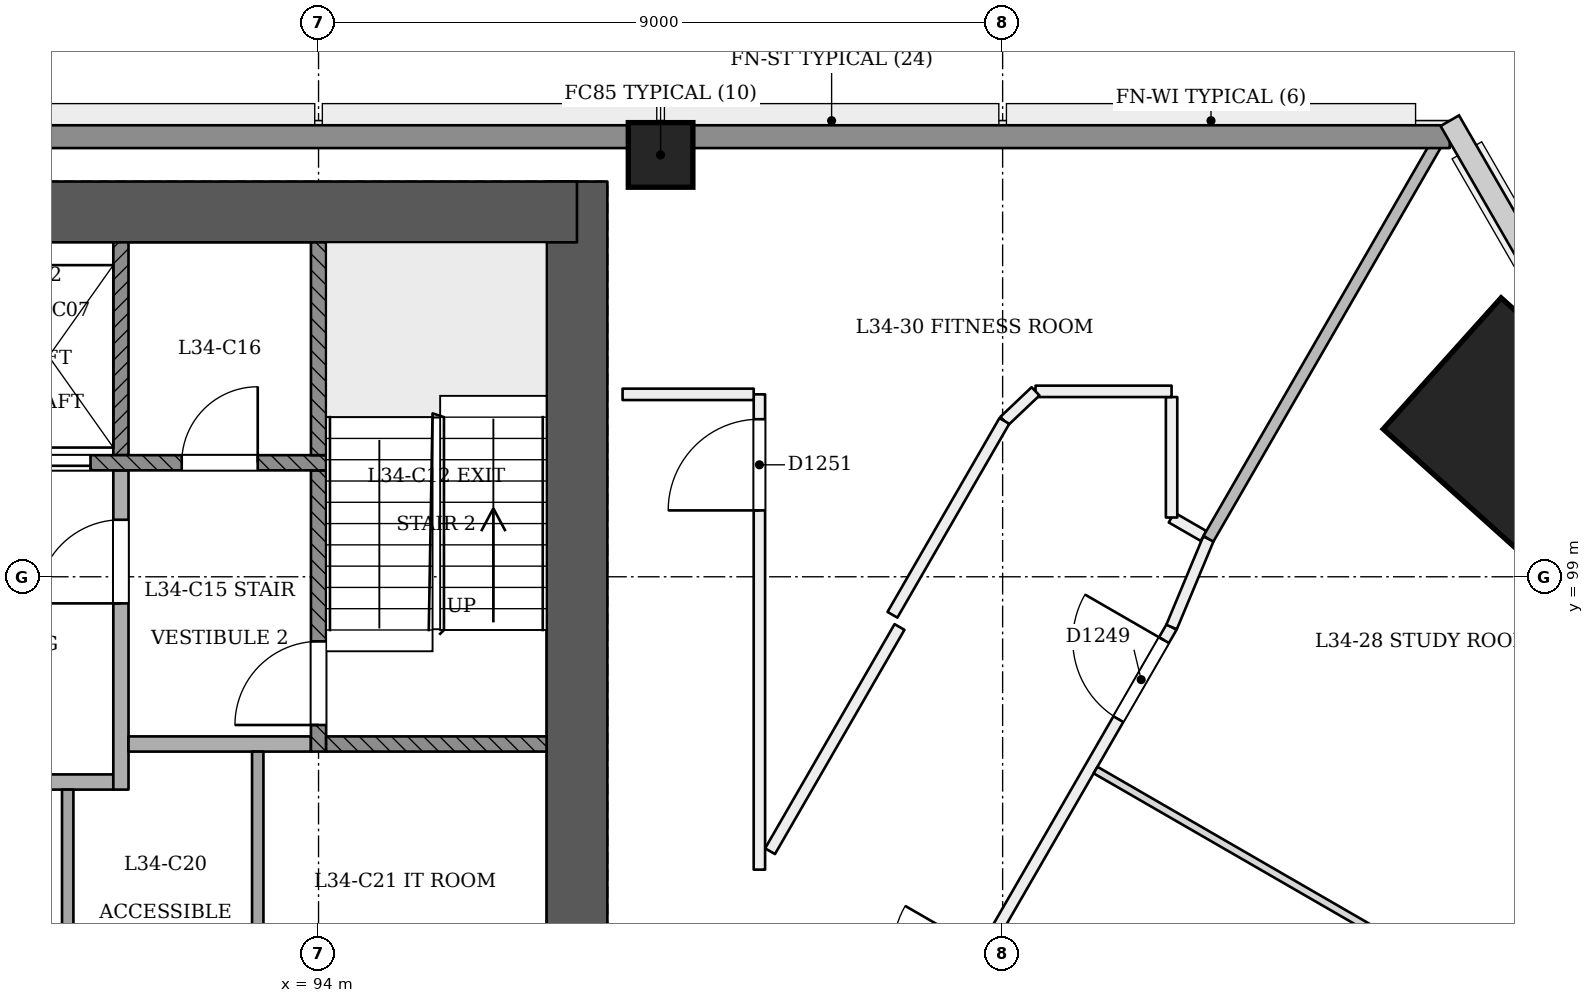
"""IFC4 building model, lengths in metres.
Left out: names, types, materials, properties, quantities, classifications, styles, units other than length and angle.
Written with IfcOpenShell. Run it as: python <this file> out.ifc"""

import sys

from ifc_helpers import new_model, si_unit, direction, frame, frame_2d, origin, origin_2d, place, context, subcontext, project, spatial, rectangle, extrude, element, fill, save


model = new_model("IFC4")
c1 = context("Model", 3, precision=1e-05, world=origin(), true_north=direction((0.0, 1.0)))
c2 = subcontext(c1, "Body", "Model", "MODEL_VIEW")
j1 = project(units=[si_unit("LENGTHUNIT", "METRE"), si_unit("PLANEANGLEUNIT", "RADIAN")], contexts=[c1])
p1 = place(None, origin())
s1 = spatial("IfcSite", under=j1, at=p1, CompositionType="ELEMENT")
p2 = place(p1, origin())
s2 = spatial("IfcBuilding", under=s1, at=p2, CompositionType="ELEMENT")
p3 = place(p2, frame((0.0, 0.0, 135.0)))
s3 = spatial("IfcBuildingStorey", under=s2, at=p3, CompositionType="ELEMENT", Elevation=135.0)
p4 = place(p3, frame((97.4, 93.0, 0.0), z_axis=(0.0, 0.0, 1.0), x_axis=(0.0, 1.0, 0.0)))
e1 = element("IfcWall", 1, at=p4, inside=s3, PredefinedType="SHEAR", context=c2, shape_type="SweptSolid", body=[
    extrude(rectangle(XDim=11.2, YDim=0.8, at=frame_2d((5.6, 0.0))), origin(), (0.0, 0.0, 1.0), 3.6),
])
p5 = place(p3, frame((97.4, 103.8, 0.0), z_axis=(0.0, 0.0, 1.0), x_axis=(-1.0, 0.0, 0.0)))
e2 = element("IfcWall", 2, at=p5, inside=s3, PredefinedType="SHEAR", context=c2, shape_type="SweptSolid", body=[
    extrude(rectangle(XDim=25.2, YDim=0.8, at=frame_2d((12.6, 0.0))), origin(), (0.0, 0.0, 1.0), 3.6),
])
p6 = place(p3, frame((109.68, 101.02, 0.0), z_axis=(-0.028401814599, 0.009218727412, 0.999554076572), x_axis=(0.500749800061, -0.865307108475, 0.022209136917)))
e3 = element("IfcColumn", 3, at=p6, inside=s3, PredefinedType="COLUMN", context=c2, shape_type="SweptSolid", body=[
    extrude(rectangle(XDim=2.32, YDim=2.32, at=origin_2d()), origin(), (0.0, 0.0, 1.0), 3.602),
])
p7 = place(p3, frame((98.5, 104.55, 0.0), z_axis=(0.0, 0.0, 1.0), x_axis=(1.0, 0.0, 0.0)))
e4 = element("IfcColumn", 4, at=p7, inside=s3, PredefinedType="COLUMN", context=c2, shape_type="SweptSolid", body=[
    extrude(rectangle(XDim=0.85, YDim=0.85, at=origin_2d()), origin(), (0.0, 0.0, 1.0), 3.6),
])
p8 = place(p3, frame((85.093, 63.473, 0.0), z_axis=(0.0, 0.0, 1.0), x_axis=(0.499997513821, 0.866026839176, 0.0)))
e5 = element("IfcWall", 5, at=p8, inside=s3, PredefinedType="PARTITIONING", context=c2, shape_type="SweptSolid", body=[
    extrude(rectangle(XDim=40.26, YDim=0.15, at=frame_2d((20.13, 0.0))), origin(), (0.0, 0.0, 1.0), 2.75),
])
p9 = place(p8, frame((0.429, 0.0, 0.0)))
e6 = element("IfcOpeningElement", 6, at=p9, cuts=e5, PredefinedType="OPENING", context=c2, shape_type="SweptSolid", body=[
    extrude(rectangle(XDim=1.2, YDim=2.1, at=frame_2d((0.6, 1.05))), frame((0.0, 0.085, 0.0), z_axis=(0.0, -1.0, 0.0), x_axis=(1.0, 0.0, 0.0)), (0.0, 0.0, 1.0), 0.171),
])
p10 = place(p8, frame((2.85, 0.0, 0.0)))
e7 = element("IfcOpeningElement", 7, at=p10, cuts=e5, PredefinedType="OPENING", context=c2, shape_type="SweptSolid", body=[
    extrude(rectangle(XDim=1.0, YDim=2.1, at=frame_2d((0.5, 1.05))), frame((0.0, 0.085, 0.0), z_axis=(0.0, -1.0, 0.0), x_axis=(1.0, 0.0, 0.0)), (0.0, 0.0, 1.0), 0.171),
])
p11 = place(p8, frame((8.28, 0.0, 0.0)))
e8 = element("IfcOpeningElement", 8, at=p11, cuts=e5, PredefinedType="OPENING", context=c2, shape_type="SweptSolid", body=[
    extrude(rectangle(XDim=1.2, YDim=2.1, at=frame_2d((0.6, 1.05))), frame((0.0, 0.085, 0.0), z_axis=(0.0, -1.0, 0.0), x_axis=(1.0, 0.0, 0.0)), (0.0, 0.0, 1.0), 0.171),
])
p12 = place(p8, frame((11.735, 0.0, 0.0)))
e9 = element("IfcOpeningElement", 9, at=p12, cuts=e5, PredefinedType="OPENING", context=c2, shape_type="SweptSolid", body=[
    extrude(rectangle(XDim=1.0, YDim=2.1, at=frame_2d((0.5, 1.05))), frame((0.0, 0.085, 0.0), z_axis=(0.0, -1.0, 0.0), x_axis=(1.0, 0.0, 0.0)), (0.0, 0.0, 1.0), 0.171),
])
p13 = place(p8, frame((18.41, 0.0, 0.0)))
e10 = element("IfcOpeningElement", 10, at=p13, cuts=e5, PredefinedType="OPENING", context=c2, shape_type="SweptSolid", body=[
    extrude(rectangle(XDim=1.0, YDim=2.1, at=frame_2d((0.5, 1.05))), frame((0.0, 0.085, 0.0), z_axis=(0.0, -1.0, 0.0), x_axis=(1.0, 0.0, 0.0)), (0.0, 0.0, 1.0), 0.171),
])
p14 = place(p8, frame((20.85, 0.0, 0.0)))
e11 = element("IfcOpeningElement", 11, at=p14, cuts=e5, PredefinedType="OPENING", context=c2, shape_type="SweptSolid", body=[
    extrude(rectangle(XDim=1.0, YDim=2.1, at=frame_2d((0.5, 1.05))), frame((0.0, 0.085, 0.0), z_axis=(0.0, -1.0, 0.0), x_axis=(1.0, 0.0, 0.0)), (0.0, 0.0, 1.0), 0.171),
])
p15 = place(p8, frame((26.38, 0.0, 0.0)))
e12 = element("IfcOpeningElement", 12, at=p15, cuts=e5, PredefinedType="OPENING", context=c2, shape_type="SweptSolid", body=[
    extrude(rectangle(XDim=1.0, YDim=2.1, at=frame_2d((0.5, 1.05))), frame((0.0, 0.085, 0.0), z_axis=(0.0, -1.0, 0.0), x_axis=(1.0, 0.0, 0.0)), (0.0, 0.0, 1.0), 0.171),
])
p16 = place(p8, frame((34.13, 0.0, 0.0)))
e13 = element("IfcOpeningElement", 13, at=p16, cuts=e5, PredefinedType="OPENING", context=c2, shape_type="SweptSolid", body=[
    extrude(rectangle(XDim=1.2, YDim=2.1, at=frame_2d((0.6, 1.05))), frame((0.0, 0.085, 0.0), z_axis=(0.0, -1.0, 0.0), x_axis=(1.0, 0.0, 0.0)), (0.0, 0.0, 1.0), 0.171),
])
p17 = place(p8, frame((38.86, 0.0, 0.0)))
e14 = element("IfcOpeningElement", 14, at=p17, cuts=e5, PredefinedType="OPENING", context=c2, shape_type="SweptSolid", body=[
    extrude(rectangle(XDim=1.2, YDim=2.1, at=frame_2d((0.6, 1.05))), frame((0.0, 0.085, 0.0), z_axis=(0.0, -1.0, 0.0), x_axis=(1.0, 0.0, 0.0)), (0.0, 0.0, 1.0), 0.171),
])
p18 = place(p3, frame((105.223, 98.34, 0.0), z_axis=(0.0, 0.0, 1.0), x_axis=(0.385373445666, 0.922760698868, 0.0)))
e15 = element("IfcWall", 15, at=p18, inside=s3, PredefinedType="PARTITIONING", context=c2, shape_type="SweptSolid", body=[
    extrude(rectangle(XDim=1.258, YDim=0.15, at=frame_2d((0.629, 0.0))), origin(), (0.0, 0.0, 1.0), 3.15),
])
p19 = place(p3, frame((105.643, 99.537, 0.0), z_axis=(0.0, 0.0, 1.0), x_axis=(-0.865942558441, 0.500143464899, 0.0)))
e16 = element("IfcWall", 16, at=p19, inside=s3, PredefinedType="PARTITIONING", context=c2, shape_type="SweptSolid", body=[
    extrude(rectangle(XDim=0.485, YDim=0.15, at=frame_2d((0.243, 0.0))), origin(), (0.0, 0.0, 1.0), 3.15),
])
p20 = place(p3, frame((105.223, 99.78, 0.0), z_axis=(0.0, 0.0, 1.0), x_axis=(0.0, 1.0, 0.0)))
e17 = element("IfcWall", 17, at=p20, inside=s3, PredefinedType="PARTITIONING", context=c2, shape_type="SweptSolid", body=[
    extrude(rectangle(XDim=1.585, YDim=0.15, at=frame_2d((0.792, 0.0))), origin(), (0.0, 0.0, 1.0), 3.15),
])
p21 = place(p3, frame((105.223, 101.439, 0.0), z_axis=(0.0, 0.0, 1.0), x_axis=(-1.0, 0.0, 0.0)))
e18 = element("IfcWall", 18, at=p21, inside=s3, PredefinedType="PARTITIONING", context=c2, shape_type="SweptSolid", body=[
    extrude(rectangle(XDim=1.79, YDim=0.15, at=frame_2d((0.895, 0.0))), origin(), (0.0, 0.0, 1.0), 3.15),
])
p22 = place(p3, frame((103.433, 101.439, 0.0), z_axis=(0.0, 0.0, 1.0), x_axis=(-0.725214952248, -0.688522529069, 0.0)))
e19 = element("IfcWall", 19, at=p22, inside=s3, PredefinedType="PARTITIONING", context=c2, shape_type="SweptSolid", body=[
    extrude(rectangle(XDim=0.566, YDim=0.15, at=frame_2d((0.283, 0.0))), origin(), (0.0, 0.0, 1.0), 3.15),
])
p23 = place(p3, frame((103.023, 101.05, 0.0), z_axis=(0.0, 0.0, 1.0), x_axis=(-0.499973660256, -0.866040610509, 0.0)))
e20 = element("IfcWall", 20, at=p23, inside=s3, PredefinedType="PARTITIONING", context=c2, shape_type="SweptSolid", body=[
    extrude(rectangle(XDim=2.945, YDim=0.15, at=frame_2d((1.472, 0.0))), origin(), (0.0, 0.0, 1.0), 3.15),
])
p24 = place(p3, frame((101.643, 98.34, 0.0), z_axis=(0.0, 0.0, 1.0), x_axis=(-0.499962338254, -0.866047146712, 0.0)))
e21 = element("IfcWall", 21, at=p24, inside=s3, PredefinedType="PARTITIONING", context=c2, shape_type="SweptSolid", body=[
    extrude(rectangle(XDim=3.406, YDim=0.15, at=frame_2d((1.703, 0.0))), origin(), (0.0, 0.0, 1.0), 3.15),
])
p25 = place(p3, frame((99.8, 95.147, 0.0), z_axis=(0.0, 0.0, 1.0), x_axis=(0.0, 1.0, 0.0)))
e22 = element("IfcWall", 22, at=p25, inside=s3, PredefinedType="PARTITIONING", context=c2, shape_type="SweptSolid", body=[
    extrude(rectangle(XDim=6.253, YDim=0.15, at=frame_2d((3.126, 0.0))), origin(), (0.0, 0.0, 1.0), 3.15),
])
p26 = place(p25, frame((4.726, 0.0, 0.0)))
e23 = element("IfcOpeningElement", 23, at=p26, cuts=e22, PredefinedType="OPENING", context=c2, shape_type="SweptSolid", body=[
    extrude(rectangle(XDim=1.2, YDim=2.1, at=frame_2d((0.6, 1.05))), frame((0.0, 0.085, 0.0), z_axis=(0.0, -1.0, 0.0), x_axis=(1.0, 0.0, 0.0)), (0.0, 0.0, 1.0), 0.171),
])
p27 = place(p3, frame((99.725, 101.4, 0.0), z_axis=(0.0, 0.0, 1.0), x_axis=(-1.0, 0.0, 0.0)))
e24 = element("IfcWall", 24, at=p27, inside=s3, PredefinedType="PARTITIONING", context=c2, shape_type="SweptSolid", body=[
    extrude(rectangle(XDim=1.725, YDim=0.15, at=frame_2d((0.863, 0.0))), origin(), (0.0, 0.0, 1.0), 3.15),
])
p28 = place(p3, frame((109.718, 93.285, 0.0), z_axis=(0.0, 0.0, 1.0), x_axis=(-0.866025401434, 0.500000004071, 0.0)))
e25 = element("IfcWall", 25, at=p28, inside=s3, PredefinedType="PARTITIONING", context=c2, shape_type="SweptSolid", body=[
    extrude(rectangle(XDim=6.345, YDim=0.1, at=frame_2d((3.173, 0.0))), origin(), (0.0, 0.0, 1.0), 2.65),
])
p29 = place(p3, frame((108.825, 104.9, 0.0), z_axis=(0.0, 0.0, 1.0), x_axis=(-0.500004896655, -0.866022576681, 0.0)))
e26 = element("IfcWall", 26, at=p29, inside=s3, PredefinedType="PARTITIONING", context=c2, shape_type="SweptSolid", body=[
    extrude(rectangle(XDim=6.235, YDim=0.15, at=frame_2d((3.118, 0.0))), origin(), (0.0, 0.0, 1.0), 2.65),
])
p30 = place(p3, frame((61.117, 104.79, 0.0), z_axis=(0.0, 0.0, 1.0), x_axis=(1.0, 0.0, 0.0)))
e27 = element("IfcWall", 27, at=p30, inside=s3, PredefinedType="SOLIDWALL", context=c2, shape_type="SweptSolid", body=[
    extrude(rectangle(XDim=47.766, YDim=0.3, at=frame_2d((23.883, 0.0))), origin(), (0.0, 0.0, 1.0), 2.65),
])
p31 = place(p3, frame((90.7, 93.4, 0.0), z_axis=(0.0, 0.0, 1.0), x_axis=(0.0, 1.0, 0.0)))
e28 = element("IfcWall", 28, at=p31, inside=s3, PredefinedType="PARTITIONING", context=c2, shape_type="SweptSolid", body=[
    extrude(rectangle(XDim=2.8, YDim=0.15, at=frame_2d((1.4, 0.0))), origin(), (0.0, 0.0, 1.0), 3.15),
])
p32 = place(p3, frame((93.2, 93.4, 0.0), z_axis=(0.0, 0.0, 1.0), x_axis=(0.0, 1.0, 0.0)))
e29 = element("IfcWall", 29, at=p32, inside=s3, PredefinedType="PARTITIONING", context=c2, shape_type="SweptSolid", body=[
    extrude(rectangle(XDim=3.3, YDim=0.15, at=frame_2d((1.65, 0.0))), origin(), (0.0, 0.0, 1.0), 3.15),
])
p33 = place(p3, frame((87.7, 96.3, 0.0), z_axis=(0.0, 0.0, 1.0), x_axis=(1.0, 0.0, 0.0)))
e30 = element("IfcWall", 30, at=p33, inside=s3, PredefinedType="PARTITIONING", context=c2, shape_type="SweptSolid", body=[
    extrude(rectangle(XDim=3.6, YDim=0.2, at=frame_2d((1.8, 0.0))), origin(), (0.0, 0.0, 1.0), 3.15),
])
p34 = place(p3, frame((91.4, 96.2, 0.0), z_axis=(0.0, 0.0, 1.0), x_axis=(0.0, 1.0, 0.0)))
e31 = element("IfcWall", 31, at=p34, inside=s3, PredefinedType="PARTITIONING", context=c2, shape_type="SweptSolid", body=[
    extrude(rectangle(XDim=4.2, YDim=0.2, at=frame_2d((2.1, 0.0))), origin(), (0.0, 0.0, 1.0), 3.15),
])
p35 = place(p34, frame((2.45, 0.0, 0.0)))
e32 = element("IfcOpeningElement", 32, at=p35, cuts=e31, PredefinedType="OPENING", context=c2, shape_type="SweptSolid", body=[
    extrude(rectangle(XDim=1.1, YDim=2.1, at=frame_2d((0.55, 1.05))), frame((0.0, 0.11, 0.0), z_axis=(0.0, -1.0, 0.0), x_axis=(1.0, 0.0, 0.0)), (0.0, 0.0, 1.0), 0.221),
])
p36 = place(p3, frame((91.5, 96.8, 0.0), z_axis=(0.0, 0.0, 1.0), x_axis=(1.0, 0.0, 0.0)))
e33 = element("IfcWall", 33, at=p36, inside=s3, PredefinedType="PARTITIONING", context=c2, shape_type="SweptSolid", body=[
    extrude(rectangle(XDim=2.4, YDim=0.2, at=frame_2d((1.2, 0.0))), origin(), (0.0, 0.0, 1.0), 3.15),
])
p37 = place(p3, frame((94.0, 96.7, 0.0), z_axis=(0.0, 0.0, 1.0), x_axis=(0.0, 1.0, 0.0)))
e34 = element("IfcWall", 34, at=p37, inside=s3, PredefinedType="SOLIDWALL", context=c2, shape_type="SweptSolid", body=[
    extrude(rectangle(XDim=3.7, YDim=0.2, at=frame_2d((1.85, 0.0))), origin(), (0.0, 0.0, 1.0), 3.15),
])
p38 = place(p37, frame((0.35, 0.0, 0.0)))
e35 = element("IfcOpeningElement", 35, at=p38, cuts=e34, PredefinedType="OPENING", context=c2, shape_type="SweptSolid", body=[
    extrude(rectangle(XDim=1.1, YDim=2.1, at=frame_2d((0.55, 1.05))), frame((0.0, 0.11, 0.0), z_axis=(0.0, -1.0, 0.0), x_axis=(1.0, 0.0, 0.0)), (0.0, 0.0, 1.0), 0.221),
])
p39 = place(p3, frame((94.1, 96.8, 0.0), z_axis=(0.0, 0.0, 1.0), x_axis=(1.0, 0.0, 0.0)))
e36 = element("IfcWall", 36, at=p39, inside=s3, PredefinedType="SOLIDWALL", context=c2, shape_type="SweptSolid", body=[
    extrude(rectangle(XDim=2.9, YDim=0.2, at=frame_2d((1.45, 0.0))), origin(), (0.0, 0.0, 1.0), 3.15),
])
p40 = place(p3, frame((75.9, 100.5, 0.0), z_axis=(0.0, 0.0, 1.0), x_axis=(1.0, 0.0, 0.0)))
e37 = element("IfcWall", 37, at=p40, inside=s3, PredefinedType="SOLIDWALL", context=c2, shape_type="SweptSolid", body=[
    extrude(rectangle(XDim=18.2, YDim=0.2, at=frame_2d((9.1, 0.0))), origin(), (0.0, 0.0, 1.0), 3.15),
])
p41 = place(p40, frame((2.6, 0.0, 0.0)))
e38 = element("IfcOpeningElement", 38, at=p41, cuts=e37, PredefinedType="OPENING", context=c2, shape_type="SweptSolid", body=[
    extrude(rectangle(XDim=1.1, YDim=2.1, at=frame_2d((0.55, 1.05))), frame((0.0, 0.11, 0.0), z_axis=(0.0, -1.0, 0.0), x_axis=(1.0, 0.0, 0.0)), (0.0, 0.0, 1.0), 0.221),
])
p42 = place(p40, frame((4.5, 0.0, 0.0)))
e39 = element("IfcOpeningElement", 39, at=p42, cuts=e37, PredefinedType="OPENING", context=c2, shape_type="SweptSolid", body=[
    extrude(rectangle(XDim=1.1, YDim=2.1, at=frame_2d((0.55, 1.05))), frame((0.0, 0.11, 0.0), z_axis=(0.0, -1.0, 0.0), x_axis=(1.0, 0.0, 0.0)), (0.0, 0.0, 1.0), 0.221),
])
p43 = place(p40, frame((6.4, 0.0, 0.0)))
e40 = element("IfcOpeningElement", 40, at=p43, cuts=e37, PredefinedType="OPENING", context=c2, shape_type="SweptSolid", body=[
    extrude(rectangle(XDim=1.1, YDim=2.1, at=frame_2d((0.55, 1.05))), frame((0.0, 0.11, 0.0), z_axis=(0.0, -1.0, 0.0), x_axis=(1.0, 0.0, 0.0)), (0.0, 0.0, 1.0), 0.221),
])
p44 = place(p40, frame((8.3, 0.0, 0.0)))
e41 = element("IfcOpeningElement", 41, at=p44, cuts=e37, PredefinedType="OPENING", context=c2, shape_type="SweptSolid", body=[
    extrude(rectangle(XDim=1.1, YDim=2.1, at=frame_2d((0.55, 1.05))), frame((0.0, 0.11, 0.0), z_axis=(0.0, -1.0, 0.0), x_axis=(1.0, 0.0, 0.0)), (0.0, 0.0, 1.0), 0.221),
])
p45 = place(p40, frame((10.2, 0.0, 0.0)))
e42 = element("IfcOpeningElement", 42, at=p45, cuts=e37, PredefinedType="OPENING", context=c2, shape_type="SweptSolid", body=[
    extrude(rectangle(XDim=1.1, YDim=2.1, at=frame_2d((0.55, 1.05))), frame((0.0, 0.11, 0.0), z_axis=(0.0, -1.0, 0.0), x_axis=(1.0, 0.0, 0.0)), (0.0, 0.0, 1.0), 0.221),
])
p46 = place(p40, frame((12.1, 0.0, 0.0)))
e43 = element("IfcOpeningElement", 43, at=p46, cuts=e37, PredefinedType="OPENING", context=c2, shape_type="SweptSolid", body=[
    extrude(rectangle(XDim=1.1, YDim=2.1, at=frame_2d((0.55, 1.05))), frame((0.0, 0.11, 0.0), z_axis=(0.0, -1.0, 0.0), x_axis=(1.0, 0.0, 0.0)), (0.0, 0.0, 1.0), 0.221),
])
p47 = place(p40, frame((14.0, 0.0, 0.0)))
e44 = element("IfcOpeningElement", 44, at=p47, cuts=e37, PredefinedType="OPENING", context=c2, shape_type="SweptSolid", body=[
    extrude(rectangle(XDim=1.1, YDim=2.1, at=frame_2d((0.55, 1.05))), frame((0.0, 0.11, 0.0), z_axis=(0.0, -1.0, 0.0), x_axis=(1.0, 0.0, 0.0)), (0.0, 0.0, 1.0), 0.221),
])
p48 = place(p40, frame((0.65, 0.0, 0.0)))
e45 = element("IfcOpeningElement", 45, at=p48, cuts=e37, PredefinedType="OPENING", context=c2, shape_type="SweptSolid", body=[
    extrude(rectangle(XDim=1.0, YDim=2.1, at=frame_2d((0.5, 1.05))), frame((0.0, 0.11, 0.0), z_axis=(0.0, -1.0, 0.0), x_axis=(1.0, 0.0, 0.0)), (0.0, 0.0, 1.0), 0.221),
])
p49 = place(p40, frame((16.3, 0.0, 0.0)))
e46 = element("IfcOpeningElement", 46, at=p49, cuts=e37, PredefinedType="OPENING", context=c2, shape_type="SweptSolid", body=[
    extrude(rectangle(XDim=1.0, YDim=2.1, at=frame_2d((0.5, 1.05))), frame((0.0, 0.11, 0.0), z_axis=(0.0, -1.0, 0.0), x_axis=(1.0, 0.0, 0.0)), (0.0, 0.0, 1.0), 0.221),
])
for number, where, z_axis, x_axis in (
    (47, (91.4, 100.6, 0.0), (0.0, 0.0, 1.0), (0.0, 1.0, 0.0)),
    (48, (94.0, 100.6, 0.0), (0.0, 0.0, 1.0), (0.0, 1.0, 0.0)),
):
    element("IfcWall", number, at=place(p3, frame(where, z_axis=z_axis, x_axis=x_axis)), inside=s3, PredefinedType="SOLIDWALL", context=c2, shape_type="SweptSolid", body=[
        extrude(rectangle(XDim=2.8, YDim=0.2, at=frame_2d((1.4, 0.0))), origin(), (0.0, 0.0, 1.0), 3.15),
    ])
p50 = place(p17, origin())
e49 = element("IfcDoor", 49, at=p50, inside=s3, OperationType="SINGLE_SWING_RIGHT", PredefinedType="NOTDEFINED", context=c2, shape_type="SweptSolid", body=[
    extrude(rectangle(XDim=1.2, YDim=2.1, at=frame_2d((0.6, 1.05))), frame((0.0, 0.025, 0.0), z_axis=(0.0, -1.0, 0.0), x_axis=(1.0, 0.0, 0.0)), (0.0, 0.0, 1.0), 0.05),
])
fill(e14, e49)
p51 = place(p26, origin())
e50 = element("IfcDoor", 50, at=p51, inside=s3, OperationType="SINGLE_SWING_LEFT", PredefinedType="NOTDEFINED", context=c2, shape_type="SweptSolid", body=[
    extrude(rectangle(XDim=1.2, YDim=2.1, at=frame_2d((0.6, 1.05))), frame((0.0, 0.025, 0.0), z_axis=(0.0, -1.0, 0.0), x_axis=(1.0, 0.0, 0.0)), (0.0, 0.0, 1.0), 0.05),
])
fill(e23, e50)
p52 = place(p47, origin())
e51 = element("IfcDoor", 51, at=p52, inside=s3, OperationType="SLIDING_TO_LEFT", PredefinedType="NOTDEFINED", context=c2, shape_type="SweptSolid", body=[
    extrude(rectangle(XDim=1.1, YDim=2.1, at=frame_2d((0.55, 1.05))), frame((0.0, 0.025, 0.0), z_axis=(0.0, -1.0, 0.0), x_axis=(1.0, 0.0, 0.0)), (0.0, 0.0, 1.0), 0.05),
])
fill(e44, e51)
p53 = place(p38, origin())
e52 = element("IfcDoor", 52, at=p53, inside=s3, OperationType="SINGLE_SWING_LEFT", PredefinedType="NOTDEFINED", context=c2, shape_type="SweptSolid", body=[
    extrude(rectangle(XDim=1.1, YDim=2.1, at=frame_2d((0.55, 1.05))), frame((0.0, 0.025, 0.0), z_axis=(0.0, -1.0, 0.0), x_axis=(1.0, 0.0, 0.0)), (0.0, 0.0, 1.0), 0.05),
])
fill(e35, e52)
p54 = place(p35, origin())
e53 = element("IfcDoor", 53, at=p54, inside=s3, OperationType="SINGLE_SWING_LEFT", PredefinedType="NOTDEFINED", context=c2, shape_type="SweptSolid", body=[
    extrude(rectangle(XDim=1.1, YDim=2.1, at=frame_2d((0.55, 1.05))), frame((0.0, 0.025, 0.0), z_axis=(0.0, -1.0, 0.0), x_axis=(1.0, 0.0, 0.0)), (0.0, 0.0, 1.0), 0.05),
])
fill(e32, e53)
p55 = place(p49, origin())
e54 = element("IfcDoor", 54, at=p55, inside=s3, OperationType="SINGLE_SWING_RIGHT", PredefinedType="NOTDEFINED", context=c2, shape_type="SweptSolid", body=[
    extrude(rectangle(XDim=1.0, YDim=2.1, at=frame_2d((0.5, 1.05))), frame((0.0, 0.025, 0.0), z_axis=(0.0, -1.0, 0.0), x_axis=(1.0, 0.0, 0.0)), (0.0, 0.0, 1.0), 0.05),
])
fill(e46, e54)
save(model, sys.argv[1])
